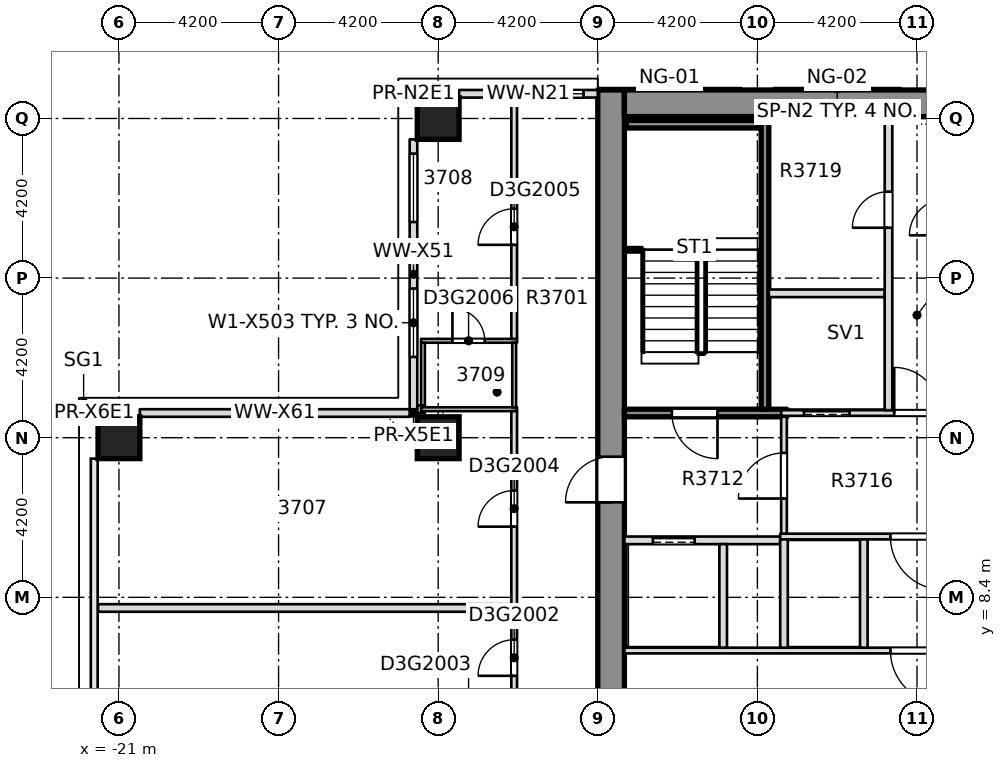
"""IFC4 building model, lengths in metres.
Left out: names, types, materials, properties, quantities, classifications, styles, units other than length and angle.
Written with IfcOpenShell. Run it as: python <this file> out.ifc"""

import sys

from ifc_helpers import new_model, si_unit, direction, frame, frame_2d, origin, origin_2d, place, context, subcontext, project, spatial, rectangle, extrude, element, fill, save


model = new_model("IFC4")
c1 = context("Model", 3, precision=1e-05, world=origin(), true_north=direction((0.0, 1.0)))
c2 = subcontext(c1, "Body", "Model", "MODEL_VIEW")
j1 = project(units=[si_unit("LENGTHUNIT", "METRE"), si_unit("PLANEANGLEUNIT", "RADIAN")], contexts=[c1])
p1 = place(None, origin())
s1 = spatial("IfcSite", under=j1, at=p1, CompositionType="ELEMENT")
p2 = place(p1, origin())
s2 = spatial("IfcBuilding", under=s1, at=p2, CompositionType="ELEMENT")
p3 = place(p2, frame((0.0, 0.0, 146.9)))
s3 = spatial("IfcBuildingStorey", under=s2, at=p3, CompositionType="ELEMENT", Elevation=146.9)
p4 = place(p3, frame((-8.05, -8.4, -0.4), z_axis=(0.0, 0.0, 1.0), x_axis=(0.0, 1.0, 0.0)))
e1 = element("IfcWall", 1, at=p4, inside=s3, PredefinedType="SOLIDWALL", context=c2, shape_type="SweptSolid", body=[
    extrude(rectangle(XDim=30.15, YDim=0.7, at=frame_2d((15.075, 0.0))), origin(), (0.0, 0.0, 1.0), 3.45),
])
p5 = place(p4, frame((19.3, 0.0, 0.4)))
e2 = element("IfcOpeningElement", 2, at=p5, cuts=e1, PredefinedType="OPENING", context=c2, shape_type="SweptSolid", body=[
    extrude(rectangle(XDim=1.2, YDim=2.1, at=frame_2d((0.6, 1.05))), frame((0.0, 0.36, 0.0), z_axis=(0.0, -1.0, 0.0), x_axis=(1.0, 0.0, 0.0)), (0.0, 0.0, 1.0), 0.72),
])
p6 = place(p3, frame((-7.7, 21.4, -0.4), z_axis=(0.0, 0.0, 1.0), x_axis=(1.0, 0.0, 0.0)))
e3 = element("IfcWall", 3, at=p6, inside=s3, PredefinedType="SHEAR", context=c2, shape_type="SweptSolid", body=[
    extrude(rectangle(XDim=15.4, YDim=0.7, at=frame_2d((7.7, 0.0))), origin(), (0.0, 0.0, 1.0), 3.45),
])
for number, where, z_axis, x_axis in (
    (4, (-21.0, 12.6, -0.4), (0.0, 0.0, 1.0), (1.0, 0.0, 0.0)),
    (5, (-12.6, 12.6, -0.4), (0.0, 0.0, 1.0), (1.0, 0.0, 0.0)),
    (6, (-12.6, 21.0, -0.4), (0.0, 0.0, 1.0), (1.0, 0.0, 0.0)),
):
    element("IfcColumn", number, at=place(p3, frame(where, z_axis=z_axis, x_axis=x_axis)), inside=s3, PredefinedType="COLUMN", context=c2, shape_type="SweptSolid", body=[
        extrude(rectangle(XDim=1.1, YDim=1.1, at=origin_2d()), origin(), (0.0, 0.0, 1.0), 3.45),
    ])
p7 = place(p3, frame((-21.55, 8.12, 0.0), z_axis=(0.0, 0.0, 1.0), x_axis=(1.0, 0.0, 0.0)))
e7 = element("IfcWall", 7, at=p7, inside=s3, PredefinedType="PARTITIONING", context=c2, shape_type="SweptSolid", body=[
    extrude(rectangle(XDim=10.875, YDim=0.2, at=frame_2d((5.438, 0.0))), origin(), (0.0, 0.0, 1.0), 3.05),
])
p8 = place(p3, frame((-13.15, 13.35, 0.0), z_axis=(0.0, 0.0, 1.0), x_axis=(1.0, 0.0, 0.0)))
e8 = element("IfcWall", 8, at=p8, inside=s3, PredefinedType="PARTITIONING", context=c2, shape_type="SweptSolid", body=[
    extrude(rectangle(XDim=0.2, YDim=0.2, at=frame_2d((0.1, 0.0))), origin(), (0.0, 0.0, 1.0), 3.05),
])
p9 = place(p3, frame((-13.05, 13.35, 0.0), z_axis=(0.0, 0.0, 1.0), x_axis=(1.0, 0.0, 0.0)))
e9 = element("IfcWall", 9, at=p9, inside=s3, PredefinedType="PARTITIONING", context=c2, shape_type="SweptSolid", body=[
    extrude(rectangle(XDim=2.525, YDim=0.1, at=frame_2d((1.263, 0.0))), origin(), (0.0, 0.0, 1.0), 3.05),
])
p10 = place(p3, frame((-13.05, 15.15, 0.0), z_axis=(0.0, 0.0, 1.0), x_axis=(1.0, 0.0, 0.0)))
e10 = element("IfcWall", 10, at=p10, inside=s3, PredefinedType="PARTITIONING", context=c2, shape_type="SweptSolid", body=[
    extrude(rectangle(XDim=2.525, YDim=0.1, at=frame_2d((1.263, 0.0))), origin(), (0.0, 0.0, 1.0), 3.05),
])
p11 = place(p10, frame((0.825, 0.0, 0.0)))
e11 = element("IfcOpeningElement", 11, at=p11, cuts=e10, PredefinedType="OPENING", context=c2, shape_type="SweptSolid", body=[
    extrude(rectangle(XDim=0.85, YDim=2.1, at=frame_2d((0.425, 1.05))), frame((0.0, 0.06, 0.0), z_axis=(0.0, -1.0, 0.0), x_axis=(1.0, 0.0, 0.0)), (0.0, 0.0, 1.0), 0.12),
])
p12 = place(p3, frame((-13.0, 13.45, 0.0), z_axis=(0.0, 0.0, 1.0), x_axis=(0.0, 1.0, 0.0)))
e12 = element("IfcWall", 12, at=p12, inside=s3, PredefinedType="PARTITIONING", context=c2, shape_type="SweptSolid", body=[
    extrude(rectangle(XDim=1.65, YDim=0.1, at=frame_2d((0.825, 0.0))), origin(), (0.0, 0.0, 1.0), 3.05),
])
p13 = place(p3, frame((-10.6, 5.55, 0.0), z_axis=(0.0, 0.0, 1.0), x_axis=(0.0, 1.0, 0.0)))
e13 = element("IfcWall", 13, at=p13, inside=s3, PredefinedType="PARTITIONING", context=c2, shape_type="SweptSolid", body=[
    extrude(rectangle(XDim=7.75, YDim=0.15, at=frame_2d((3.875, 0.0))), origin(), (0.0, 0.0, 1.0), 3.05),
])
p14 = place(p13, frame((0.785, 0.0, 0.0)))
e14 = element("IfcOpeningElement", 14, at=p14, cuts=e13, PredefinedType="OPENING", context=c2, shape_type="SweptSolid", body=[
    extrude(rectangle(XDim=0.95, YDim=2.1, at=frame_2d((0.475, 1.05))), frame((0.0, 0.085, 0.0), z_axis=(0.0, -1.0, 0.0), x_axis=(1.0, 0.0, 0.0)), (0.0, 0.0, 1.0), 0.17),
])
p15 = place(p13, frame((4.71, 0.0, 0.0)))
e15 = element("IfcOpeningElement", 15, at=p15, cuts=e13, PredefinedType="OPENING", context=c2, shape_type="SweptSolid", body=[
    extrude(rectangle(XDim=0.95, YDim=2.1, at=frame_2d((0.475, 1.05))), frame((0.0, 0.085, 0.0), z_axis=(0.0, -1.0, 0.0), x_axis=(1.0, 0.0, 0.0)), (0.0, 0.0, 1.0), 0.17),
])
p16 = place(p3, frame((-10.6, 13.4, 0.0), z_axis=(0.0, 0.0, 1.0), x_axis=(0.0, 1.0, 0.0)))
e16 = element("IfcWall", 16, at=p16, inside=s3, PredefinedType="PARTITIONING", context=c2, shape_type="SweptSolid", body=[
    extrude(rectangle(XDim=1.7, YDim=0.1, at=frame_2d((0.85, 0.0))), origin(), (0.0, 0.0, 1.0), 3.05),
])
p17 = place(p3, frame((-10.6, 15.2, 0.0), z_axis=(0.0, 0.0, 1.0), x_axis=(0.0, 1.0, 0.0)))
e17 = element("IfcWall", 17, at=p17, inside=s3, PredefinedType="PARTITIONING", context=c2, shape_type="SweptSolid", body=[
    extrude(rectangle(XDim=6.35, YDim=0.15, at=frame_2d((3.175, 0.0))), origin(), (0.0, 0.0, 1.0), 3.05),
])
p18 = place(p17, frame((2.475, 0.0, 0.0)))
e18 = element("IfcOpeningElement", 18, at=p18, cuts=e17, PredefinedType="OPENING", context=c2, shape_type="SweptSolid", body=[
    extrude(rectangle(XDim=0.95, YDim=2.1, at=frame_2d((0.475, 1.05))), frame((0.0, 0.085, 0.0), z_axis=(0.0, -1.0, 0.0), x_axis=(1.0, 0.0, 0.0)), (0.0, 0.0, 1.0), 0.17),
])
p19 = place(p3, frame((-8.4, 21.65, 0.0), z_axis=(0.0, 0.0, 1.0), x_axis=(-1.0, 0.0, 0.0)))
e19 = element("IfcWall", 19, at=p19, inside=s3, PredefinedType="STANDARD", context=c2, shape_type="SweptSolid", body=[
    extrude(rectangle(XDim=3.65, YDim=0.2, at=frame_2d((1.825, 0.0))), origin(), (0.0, 0.0, 1.0), 3.05),
])
p20 = place(p19, frame((0.375, 0.0, 0.2)))
e20 = element("IfcOpeningElement", 20, at=p20, cuts=e19, PredefinedType="OPENING", context=c2, shape_type="SweptSolid", body=[
    extrude(rectangle(XDim=1.8, YDim=2.65, at=frame_2d((0.9, 1.325))), frame((0.0, 0.11, 0.0), z_axis=(0.0, -1.0, 0.0), x_axis=(1.0, 0.0, 0.0)), (0.0, 0.0, 1.0), 0.22),
])
p21 = place(p3, frame((-13.25, 20.45, 0.0), z_axis=(0.0, 0.0, 1.0), x_axis=(0.0, -1.0, 0.0)))
e21 = element("IfcWall", 21, at=p21, inside=s3, PredefinedType="STANDARD", context=c2, shape_type="SweptSolid", body=[
    extrude(rectangle(XDim=7.1, YDim=0.2, at=frame_2d((3.55, 0.0))), origin(), (0.0, 0.0, 1.0), 3.05),
])
p22 = place(p21, frame((3.925, 0.0, 0.2)))
e22 = element("IfcOpeningElement", 22, at=p22, cuts=e21, PredefinedType="OPENING", context=c2, shape_type="SweptSolid", body=[
    extrude(rectangle(XDim=1.8, YDim=2.65, at=frame_2d((0.9, 1.325))), frame((0.0, 0.11, 0.0), z_axis=(0.0, -1.0, 0.0), x_axis=(1.0, 0.0, 0.0)), (0.0, 0.0, 1.0), 0.22),
])
p23 = place(p21, frame((0.375, 0.0, 0.2)))
e23 = element("IfcOpeningElement", 23, at=p23, cuts=e21, PredefinedType="OPENING", context=c2, shape_type="SweptSolid", body=[
    extrude(rectangle(XDim=1.8, YDim=2.65, at=frame_2d((0.9, 1.325))), frame((0.0, 0.11, 0.0), z_axis=(0.0, -1.0, 0.0), x_axis=(1.0, 0.0, 0.0)), (0.0, 0.0, 1.0), 0.22),
])
p24 = place(p3, frame((-13.35, 13.25, 0.0), z_axis=(0.0, 0.0, 1.0), x_axis=(-1.0, 0.0, 0.0)))
e24 = element("IfcWall", 24, at=p24, inside=s3, PredefinedType="STANDARD", context=c2, shape_type="SweptSolid", body=[
    extrude(rectangle(XDim=7.1, YDim=0.2, at=frame_2d((3.55, 0.0))), origin(), (0.0, 0.0, 1.0), 3.05),
])
p25 = place(p3, frame((-7.699, 7.0, 0.0), z_axis=(0.0, 0.0, 1.0), x_axis=(1.0, 0.0, 0.0)))
e25 = element("IfcWall", 25, at=p25, inside=s3, PredefinedType="PARTITIONING", context=c2, shape_type="SweptSolid", body=[
    extrude(rectangle(XDim=15.398, YDim=0.15, at=frame_2d((7.699, 0.0))), origin(), (0.0, 0.0, 1.0), 3.05),
])
p26 = place(p25, frame((6.999, 0.0, 0.0)))
e26 = element("IfcOpeningElement", 26, at=p26, cuts=e25, PredefinedType="OPENING", context=c2, shape_type="SweptSolid", body=[
    extrude(rectangle(XDim=1.4, YDim=2.1, at=frame_2d((0.7, 1.05))), frame((0.0, 0.085, 0.0), z_axis=(0.0, -1.0, 0.0), x_axis=(1.0, 0.0, 0.0)), (0.0, 0.0, 1.0), 0.17),
])
p27 = place(p3, frame((-7.699, 9.9, 0.0), z_axis=(0.0, 0.0, 1.0), x_axis=(1.0, 0.0, 0.0)))
e27 = element("IfcWall", 27, at=p27, inside=s3, PredefinedType="PARTITIONING", context=c2, shape_type="SweptSolid", body=[
    extrude(rectangle(XDim=4.099, YDim=0.2, at=frame_2d((2.049, 0.0))), origin(), (0.0, 0.0, 1.0), 3.05),
])
p28 = place(p27, frame((0.749, 0.0, 0.0)))
e28 = element("IfcOpeningElement", 28, at=p28, cuts=e27, PredefinedType="OPENING", context=c2, shape_type="SweptSolid", body=[
    extrude(rectangle(XDim=1.1, YDim=2.1, at=frame_2d((0.55, 1.05))), frame((0.0, 0.11, 0.0), z_axis=(0.0, -1.0, 0.0), x_axis=(1.0, 0.0, 0.0)), (0.0, 0.0, 1.0), 0.22),
])
p29 = place(p3, frame((-3.6, 10.0, 0.0), z_axis=(0.0, 0.0, 1.0), x_axis=(1.0, 0.0, 0.0)))
e29 = element("IfcWall", 29, at=p29, inside=s3, PredefinedType="PARTITIONING", context=c2, shape_type="SweptSolid", body=[
    extrude(rectangle(XDim=7.2, YDim=0.15, at=frame_2d((3.6, 0.0))), origin(), (0.0, 0.0, 1.0), 3.05),
])
p30 = place(p29, frame((2.9, 0.0, 0.0)))
e30 = element("IfcOpeningElement", 30, at=p30, cuts=e29, PredefinedType="OPENING", context=c2, shape_type="SweptSolid", body=[
    extrude(rectangle(XDim=1.4, YDim=2.1, at=frame_2d((0.7, 1.05))), frame((0.0, 0.085, 0.0), z_axis=(0.0, -1.0, 0.0), x_axis=(1.0, 0.0, 0.0)), (0.0, 0.0, 1.0), 0.17),
])
p31 = place(p3, frame((-7.699, 13.25, 0.0), z_axis=(0.0, 0.0, 1.0), x_axis=(1.0, 0.0, 0.0)))
e31 = element("IfcWall", 31, at=p31, inside=s3, PredefinedType="SOLIDWALL", context=c2, shape_type="SweptSolid", body=[
    extrude(rectangle(XDim=4.274, YDim=0.2, at=frame_2d((2.137, 0.0))), origin(), (0.0, 0.0, 1.0), 3.05),
])
p32 = place(p31, frame((1.249, 0.0, 0.0)))
e32 = element("IfcOpeningElement", 32, at=p32, cuts=e31, PredefinedType="OPENING", context=c2, shape_type="SweptSolid", body=[
    extrude(rectangle(XDim=1.2, YDim=2.1, at=frame_2d((0.6, 1.05))), frame((0.0, 0.11, 0.0), z_axis=(0.0, -1.0, 0.0), x_axis=(1.0, 0.0, 0.0)), (0.0, 0.0, 1.0), 0.22),
])
p33 = place(p3, frame((-3.575, 13.25, 0.0), z_axis=(0.0, 0.0, 1.0), x_axis=(1.0, 0.0, 0.0)))
e33 = element("IfcWall", 33, at=p33, inside=s3, PredefinedType="PARTITIONING", context=c2, shape_type="SweptSolid", body=[
    extrude(rectangle(XDim=7.15, YDim=0.15, at=frame_2d((3.575, 0.0))), origin(), (0.0, 0.0, 1.0), 3.05),
])
p34 = place(p33, frame((0.6, 0.0, 0.0)))
e34 = element("IfcOpeningElement", 34, at=p34, cuts=e33, PredefinedType="OPENING", context=c2, shape_type="SweptSolid", body=[
    extrude(rectangle(XDim=1.2, YDim=2.1, at=frame_2d((0.6, 1.05))), frame((0.0, 0.085, 0.0), z_axis=(0.0, -1.0, 0.0), x_axis=(1.0, 0.0, 0.0)), (0.0, 0.0, 1.0), 0.17),
])
p35 = place(p33, frame((5.4, 0.0, 0.0)))
e35 = element("IfcOpeningElement", 35, at=p35, cuts=e33, PredefinedType="OPENING", context=c2, shape_type="SweptSolid", body=[
    extrude(rectangle(XDim=1.1, YDim=2.1, at=frame_2d((0.55, 1.05))), frame((0.0, 0.085, 0.0), z_axis=(0.0, -1.0, 0.0), x_axis=(1.0, 0.0, 0.0)), (0.0, 0.0, 1.0), 0.17),
])
p36 = place(p33, frame((2.975, 0.0, 0.0)))
e36 = element("IfcOpeningElement", 36, at=p36, cuts=e33, PredefinedType="OPENING", context=c2, shape_type="SweptSolid", body=[
    extrude(rectangle(XDim=1.2, YDim=2.1, at=frame_2d((0.6, 1.05))), frame((0.0, 0.085, 0.0), z_axis=(0.0, -1.0, 0.0), x_axis=(1.0, 0.0, 0.0)), (0.0, 0.0, 1.0), 0.17),
])
p37 = place(p3, frame((-3.9, 16.4, 0.0), z_axis=(0.0, 0.0, 1.0), x_axis=(1.0, 0.0, 0.0)))
e37 = element("IfcWall", 37, at=p37, inside=s3, PredefinedType="PARTITIONING", context=c2, shape_type="SweptSolid", body=[
    extrude(rectangle(XDim=3.05, YDim=0.2, at=frame_2d((1.525, 0.0))), origin(), (0.0, 0.0, 1.0), 3.05),
])
p38 = place(p3, frame((-5.1, 7.075, 0.0), z_axis=(0.0, 0.0, 1.0), x_axis=(0.0, 1.0, 0.0)))
e38 = element("IfcWall", 38, at=p38, inside=s3, PredefinedType="PARTITIONING", context=c2, shape_type="SweptSolid", body=[
    extrude(rectangle(XDim=2.725, YDim=0.2, at=frame_2d((1.363, 0.0))), origin(), (0.0, 0.0, 1.0), 3.05),
])
p39 = place(p3, frame((-4.0, 13.35, 0.0), z_axis=(0.0, 0.0, 1.0), x_axis=(0.0, 1.0, 0.0)))
e39 = element("IfcWall", 39, at=p39, inside=s3, PredefinedType="SOLIDWALL", context=c2, shape_type="SweptSolid", body=[
    extrude(rectangle(XDim=7.699, YDim=0.2, at=frame_2d((3.85, 0.0))), origin(), (0.0, 0.0, 1.0), 3.05),
])
p40 = place(p3, frame((-3.5, 7.075, 0.0), z_axis=(0.0, 0.0, 1.0), x_axis=(0.0, 1.0, 0.0)))
e40 = element("IfcWall", 40, at=p40, inside=s3, PredefinedType="PARTITIONING", context=c2, shape_type="SweptSolid", body=[
    extrude(rectangle(XDim=2.85, YDim=0.2, at=frame_2d((1.425, 0.0))), origin(), (0.0, 0.0, 1.0), 3.05),
])
p41 = place(p3, frame((-3.5, 10.075, 0.0), z_axis=(0.0, 0.0, 1.0), x_axis=(0.0, 1.0, 0.0)))
e41 = element("IfcWall", 41, at=p41, inside=s3, PredefinedType="PARTITIONING", context=c2, shape_type="SweptSolid", body=[
    extrude(rectangle(XDim=3.075, YDim=0.15, at=frame_2d((1.538, 0.0))), origin(), (0.0, 0.0, 1.0), 3.05),
])
p42 = place(p41, frame((0.925, 0.0, 0.0)))
e42 = element("IfcOpeningElement", 42, at=p42, cuts=e41, PredefinedType="OPENING", context=c2, shape_type="SweptSolid", body=[
    extrude(rectangle(XDim=1.2, YDim=2.1, at=frame_2d((0.6, 1.05))), frame((0.0, 0.085, 0.0), z_axis=(0.0, -1.0, 0.0), x_axis=(1.0, 0.0, 0.0)), (0.0, 0.0, 1.0), 0.17),
])
p43 = place(p3, frame((-1.4, 7.075, 0.0), z_axis=(0.0, 0.0, 1.0), x_axis=(0.0, 1.0, 0.0)))
e43 = element("IfcWall", 43, at=p43, inside=s3, PredefinedType="PARTITIONING", context=c2, shape_type="SweptSolid", body=[
    extrude(rectangle(XDim=2.85, YDim=0.2, at=frame_2d((1.425, 0.0))), origin(), (0.0, 0.0, 1.0), 3.05),
])
p44 = place(p3, frame((-0.75, 13.325, 0.0), z_axis=(0.0, 0.0, 1.0), x_axis=(0.0, 1.0, 0.0)))
e44 = element("IfcWall", 44, at=p44, inside=s3, PredefinedType="PARTITIONING", context=c2, shape_type="SweptSolid", body=[
    extrude(rectangle(XDim=7.724, YDim=0.2, at=frame_2d((3.862, 0.0))), origin(), (0.0, 0.0, 1.0), 3.05),
])
p45 = place(p44, frame((4.8, 0.0, 0.0)))
e45 = element("IfcOpeningElement", 45, at=p45, cuts=e44, PredefinedType="OPENING", context=c2, shape_type="SweptSolid", body=[
    extrude(rectangle(XDim=0.95, YDim=2.1, at=frame_2d((0.475, 1.05))), frame((0.0, 0.11, 0.0), z_axis=(0.0, -1.0, 0.0), x_axis=(1.0, 0.0, 0.0)), (0.0, 0.0, 1.0), 0.22),
])
p46 = place(p3, frame((-7.65, 20.85, 0.0), z_axis=(0.0, 0.0, 1.0), x_axis=(1.0, 0.0, 0.0)))
e46 = element("IfcWall", 46, at=p46, inside=s3, PredefinedType="SOLIDWALL", context=c2, shape_type="SweptSolid", body=[
    extrude(rectangle(XDim=3.5, YDim=0.2, at=frame_2d((1.75, 0.0))), origin(), (0.0, 0.0, 1.0), 3.05),
])
p47 = place(p14, origin())
e47 = element("IfcDoor", 47, at=p47, inside=s3, OperationType="SINGLE_SWING_LEFT", PredefinedType="DOOR", context=c2, shape_type="SweptSolid", body=[
    extrude(rectangle(XDim=0.95, YDim=2.1, at=frame_2d((0.475, 1.05))), frame((0.0, 0.025, 0.0), z_axis=(0.0, -1.0, 0.0), x_axis=(1.0, 0.0, 0.0)), (0.0, 0.0, 1.0), 0.05),
])
fill(e14, e47)
p48 = place(p15, origin())
e48 = element("IfcDoor", 48, at=p48, inside=s3, OperationType="SINGLE_SWING_RIGHT", PredefinedType="DOOR", context=c2, shape_type="SweptSolid", body=[
    extrude(rectangle(XDim=0.95, YDim=2.1, at=frame_2d((0.475, 1.05))), frame((0.0, 0.025, 0.0), z_axis=(0.0, -1.0, 0.0), x_axis=(1.0, 0.0, 0.0)), (0.0, 0.0, 1.0), 0.05),
])
fill(e15, e48)
p49 = place(p18, origin())
e49 = element("IfcDoor", 49, at=p49, inside=s3, OperationType="SINGLE_SWING_RIGHT", PredefinedType="DOOR", context=c2, shape_type="SweptSolid", body=[
    extrude(rectangle(XDim=0.95, YDim=2.1, at=frame_2d((0.475, 1.05))), frame((0.0, 0.025, 0.0), z_axis=(0.0, -1.0, 0.0), x_axis=(1.0, 0.0, 0.0)), (0.0, 0.0, 1.0), 0.05),
])
fill(e18, e49)
p50 = place(p11, origin())
e50 = element("IfcDoor", 50, at=p50, inside=s3, OperationType="SINGLE_SWING_RIGHT", PredefinedType="DOOR", context=c2, shape_type="SweptSolid", body=[
    extrude(rectangle(XDim=0.85, YDim=2.1, at=frame_2d((0.425, 1.05))), frame((0.0, 0.025, 0.0), z_axis=(0.0, -1.0, 0.0), x_axis=(1.0, 0.0, 0.0)), (0.0, 0.0, 1.0), 0.05),
])
fill(e11, e50)
p51 = place(p20, origin())
e51 = element("IfcWindow", 51, at=p51, inside=s3, PartitioningType="SINGLE_PANEL", PredefinedType="WINDOW", context=c2, shape_type="SweptSolid", body=[
    extrude(rectangle(XDim=1.8, YDim=2.65, at=frame_2d((0.9, 1.325))), frame((0.0, 0.03, 0.0), z_axis=(0.0, -1.0, 0.0), x_axis=(1.0, 0.0, 0.0)), (0.0, 0.0, 1.0), 0.06),
])
fill(e20, e51)
p52 = place(p22, origin())
e52 = element("IfcWindow", 52, at=p52, inside=s3, PartitioningType="SINGLE_PANEL", PredefinedType="WINDOW", context=c2, shape_type="SweptSolid", body=[
    extrude(rectangle(XDim=1.8, YDim=2.65, at=frame_2d((0.9, 1.325))), frame((0.0, 0.03, 0.0), z_axis=(0.0, -1.0, 0.0), x_axis=(1.0, 0.0, 0.0)), (0.0, 0.0, 1.0), 0.06),
])
fill(e22, e52)
p53 = place(p23, origin())
e53 = element("IfcWindow", 53, at=p53, inside=s3, PartitioningType="SINGLE_PANEL", PredefinedType="WINDOW", context=c2, shape_type="SweptSolid", body=[
    extrude(rectangle(XDim=1.8, YDim=2.65, at=frame_2d((0.9, 1.325))), frame((0.0, 0.03, 0.0), z_axis=(0.0, -1.0, 0.0), x_axis=(1.0, 0.0, 0.0)), (0.0, 0.0, 1.0), 0.06),
])
fill(e23, e53)
p54 = place(p32, origin())
e54 = element("IfcDoor", 54, at=p54, inside=s3, OperationType="SINGLE_SWING_LEFT", PredefinedType="DOOR", context=c2, shape_type="SweptSolid", body=[
    extrude(rectangle(XDim=1.2, YDim=2.1, at=frame_2d((0.6, 1.05))), frame((0.0, 0.025, 0.0), z_axis=(0.0, -1.0, 0.0), x_axis=(1.0, 0.0, 0.0)), (0.0, 0.0, 1.0), 0.05),
])
fill(e32, e54)
p55 = place(p28, origin())
e55 = element("IfcDoor", 55, at=p55, inside=s3, OperationType="SLIDING_TO_RIGHT", PredefinedType="DOOR", context=c2, shape_type="SweptSolid", body=[
    extrude(rectangle(XDim=1.1, YDim=2.1, at=frame_2d((0.55, 1.05))), frame((0.0, 0.025, 0.0), z_axis=(0.0, -1.0, 0.0), x_axis=(1.0, 0.0, 0.0)), (0.0, 0.0, 1.0), 0.05),
])
fill(e28, e55)
p56 = place(p26, origin())
e56 = element("IfcDoor", 56, at=p56, inside=s3, OperationType="SINGLE_SWING_RIGHT", PredefinedType="DOOR", context=c2, shape_type="SweptSolid", body=[
    extrude(rectangle(XDim=1.4, YDim=2.1, at=frame_2d((0.7, 1.05))), frame((0.0, 0.025, 0.0), z_axis=(0.0, -1.0, 0.0), x_axis=(1.0, 0.0, 0.0)), (0.0, 0.0, 1.0), 0.05),
])
fill(e26, e56)
p57 = place(p30, origin())
e57 = element("IfcDoor", 57, at=p57, inside=s3, OperationType="SINGLE_SWING_RIGHT", PredefinedType="DOOR", context=c2, shape_type="SweptSolid", body=[
    extrude(rectangle(XDim=1.4, YDim=2.1, at=frame_2d((0.7, 1.05))), frame((0.0, 0.025, 0.0), z_axis=(0.0, -1.0, 0.0), x_axis=(1.0, 0.0, 0.0)), (0.0, 0.0, 1.0), 0.05),
])
fill(e30, e57)
p58 = place(p34, origin())
e58 = element("IfcDoor", 58, at=p58, inside=s3, OperationType="SLIDING_TO_RIGHT", PredefinedType="DOOR", context=c2, shape_type="SweptSolid", body=[
    extrude(rectangle(XDim=1.2, YDim=2.1, at=frame_2d((0.6, 1.05))), frame((0.0, 0.025, 0.0), z_axis=(0.0, -1.0, 0.0), x_axis=(1.0, 0.0, 0.0)), (0.0, 0.0, 1.0), 0.05),
])
fill(e34, e58)
p59 = place(p36, origin())
e59 = element("IfcDoor", 59, at=p59, inside=s3, OperationType="SINGLE_SWING_RIGHT", PredefinedType="DOOR", context=c2, shape_type="SweptSolid", body=[
    extrude(rectangle(XDim=1.2, YDim=2.1, at=frame_2d((0.6, 1.05))), frame((0.0, 0.025, 0.0), z_axis=(0.0, -1.0, 0.0), x_axis=(1.0, 0.0, 0.0)), (0.0, 0.0, 1.0), 0.05),
])
fill(e36, e59)
p60 = place(p45, origin())
e60 = element("IfcDoor", 60, at=p60, inside=s3, OperationType="SINGLE_SWING_RIGHT", PredefinedType="DOOR", context=c2, shape_type="SweptSolid", body=[
    extrude(rectangle(XDim=0.95, YDim=2.1, at=frame_2d((0.475, 1.05))), frame((0.0, 0.025, 0.0), z_axis=(0.0, -1.0, 0.0), x_axis=(1.0, 0.0, 0.0)), (0.0, 0.0, 1.0), 0.05),
])
fill(e45, e60)
p61 = place(p42, origin())
e61 = element("IfcDoor", 61, at=p61, inside=s3, OperationType="SINGLE_SWING_RIGHT", PredefinedType="DOOR", context=c2, shape_type="SweptSolid", body=[
    extrude(rectangle(XDim=1.2, YDim=2.1, at=frame_2d((0.6, 1.05))), frame((0.0, 0.025, 0.0), z_axis=(0.0, -1.0, 0.0), x_axis=(1.0, 0.0, 0.0)), (0.0, 0.0, 1.0), 0.05),
])
fill(e42, e61)
p62 = place(p5, origin())
e62 = element("IfcDoor", 62, at=p62, inside=s3, OperationType="SINGLE_SWING_LEFT", PredefinedType="DOOR", context=c2, shape_type="SweptSolid", body=[
    extrude(rectangle(XDim=1.2, YDim=2.1, at=frame_2d((0.6, 1.05))), frame((0.0, 0.025, 0.0), z_axis=(0.0, -1.0, 0.0), x_axis=(1.0, 0.0, 0.0)), (0.0, 0.0, 1.0), 0.05),
])
fill(e2, e62)
save(model, sys.argv[1])
